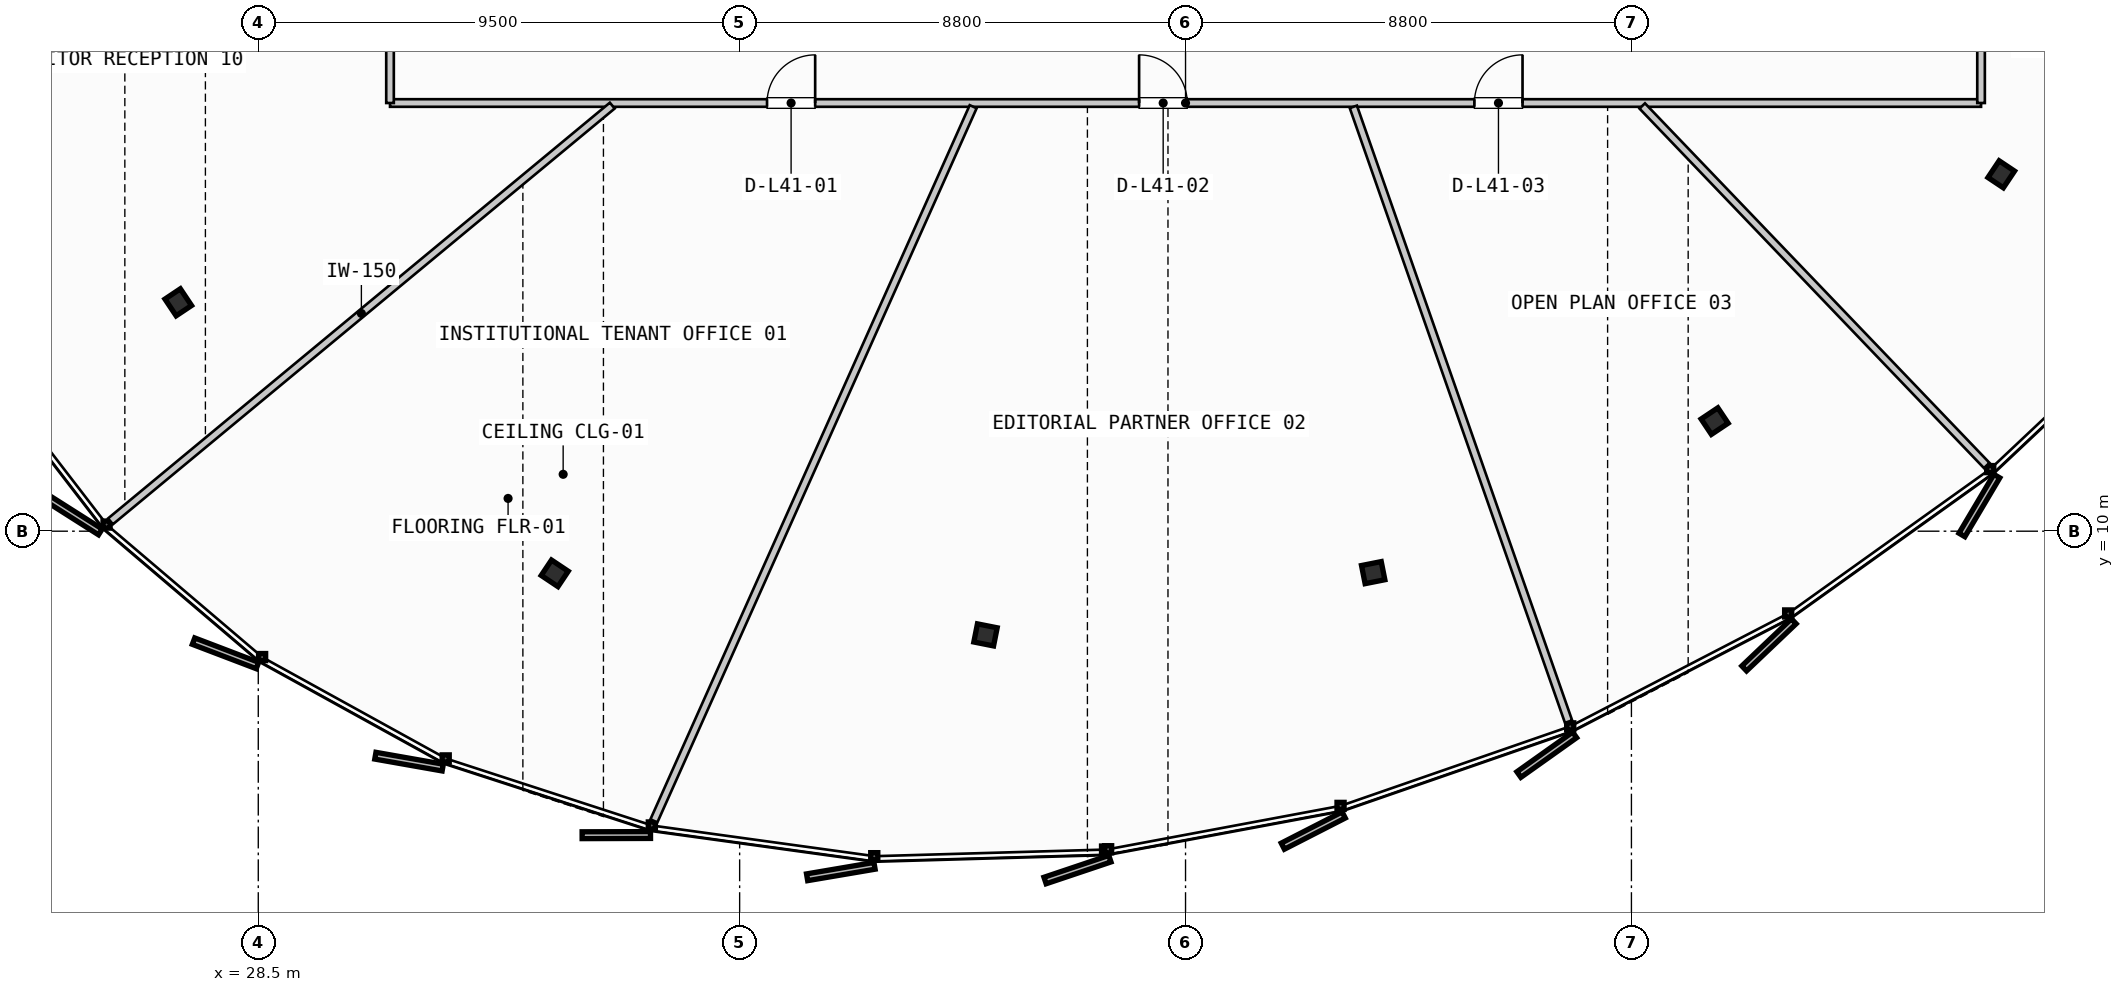
"""IFC4 building model, lengths in metres.
Left out: names, types, materials, properties, quantities, classifications, styles, units other than length and angle.
Written with IfcOpenShell. Run it as: python <this file> out.ifc"""

import sys

from ifc_helpers import new_model, si_unit, direction, frame, frame_2d, origin, origin_2d, place, context, subcontext, project, spatial, rectangle, i_section, extrude, source, transform, mapped, element, fill, save


model = new_model("IFC4")
c1 = context("Model", 3, precision=1e-05, world=origin(), true_north=direction((0.0, 1.0)))
c2 = subcontext(c1, "Body", "Model", "MODEL_VIEW")
j1 = project(units=[si_unit("LENGTHUNIT", "METRE"), si_unit("PLANEANGLEUNIT", "RADIAN")], contexts=[c1])
p1 = place(None, origin())
s1 = spatial("IfcSite", under=j1, at=p1, CompositionType="ELEMENT")
p2 = place(p1, origin())
s2 = spatial("IfcBuilding", under=s1, at=p2, CompositionType="ELEMENT")
p3 = place(p2, frame((0.0, 0.0, 160.75)))
s3 = spatial("IfcBuildingStorey", under=s2, at=p3, CompositionType="ELEMENT", Elevation=160.75)
m1 = source(origin(), c2, "Body", "SweptSolid", [
    extrude(i_section(OverallWidth=0.397, OverallDepth=0.365, WebThickness=0.028, FlangeThickness=0.044, FilletRadius=0.015, at=origin_2d()), origin(), (0.0, 0.0, 1.0), 3.3),
])
for number, where, z_axis, x_axis in (
    (1, (26.921, 14.517, 0.0), (0.0, 0.0, 1.0), (-0.831, -0.556, 0.0)),
    (2, (34.351, 9.168, 0.0), (0.0, 0.0, 1.0), (-0.556, -0.831, 0.0)),
    (3, (42.852, 7.954, 0.0), (0.0, 0.0, 1.0), (-0.195, -0.981, 0.0)),
    (4, (50.503, 9.182, 0.0), (0.0, 0.0, 1.0), (0.195, -0.981, 0.0)),
    (5, (57.242, 12.172, 0.0), (0.0, 0.0, 1.0), (0.556, -0.831, 0.0)),
    (6, (62.899, 17.043, 0.0), (0.0, 0.0, 1.0), (0.831, -0.556, 0.0)),
):
    element("IfcColumn", number, at=place(p3, frame(where, z_axis=z_axis, x_axis=x_axis)), inside=s3, PredefinedType="COLUMN", context=c2, shape_type="MappedRepresentation", body=[
        mapped(m1, transform((0.0, 0.0, 0.0), scale=1.0)),
    ])
p4 = place(p3, frame((31.1, 18.45, 0.0), z_axis=(0.0, 0.0, 1.0), x_axis=(1.0, 0.0, 0.0)))
e7 = element("IfcWall", 7, at=p4, inside=s3, PredefinedType="PARTITIONING", context=c2, shape_type="SweptSolid", body=[
    extrude(rectangle(XDim=31.4, YDim=0.15, at=frame_2d((15.7, 0.0))), origin(), (0.0, 0.0, 1.0), 2.28),
])
p5 = place(p4, frame((7.441, 0.0, 0.0)))
e8 = element("IfcOpeningElement", 8, at=p5, cuts=e7, PredefinedType="OPENING", context=c2, shape_type="SweptSolid", body=[
    extrude(rectangle(XDim=0.95, YDim=2.15, at=frame_2d((0.475, 1.075))), frame((0.0, 0.085, 0.0), z_axis=(0.0, -1.0, 0.0), x_axis=(1.0, 0.0, 0.0)), (0.0, 0.0, 1.0), 0.17),
])
p6 = place(p4, frame((14.784, 0.0, 0.0)))
e9 = element("IfcOpeningElement", 9, at=p6, cuts=e7, PredefinedType="OPENING", context=c2, shape_type="SweptSolid", body=[
    extrude(rectangle(XDim=0.95, YDim=2.15, at=frame_2d((0.475, 1.075))), frame((0.0, 0.085, 0.0), z_axis=(0.0, -1.0, 0.0), x_axis=(1.0, 0.0, 0.0)), (0.0, 0.0, 1.0), 0.17),
])
p7 = place(p4, frame((21.401, 0.0, 0.0)))
e10 = element("IfcOpeningElement", 10, at=p7, cuts=e7, PredefinedType="OPENING", context=c2, shape_type="SweptSolid", body=[
    extrude(rectangle(XDim=0.95, YDim=2.15, at=frame_2d((0.475, 1.075))), frame((0.0, 0.085, 0.0), z_axis=(0.0, -1.0, 0.0), x_axis=(1.0, 0.0, 0.0)), (0.0, 0.0, 1.0), 0.17),
])
for number, where, z_axis, x_axis in (
    (11, (62.5, 18.45, 0.0), (0.0, 0.0, 1.0), (0.0, 1.0, 0.0)),
    (12, (31.1, 20.15, 0.0), (0.0, 0.0, 1.0), (0.0, -1.0, 0.0)),
):
    element("IfcWall", number, at=place(p3, frame(where, z_axis=z_axis, x_axis=x_axis)), inside=s3, PredefinedType="PARTITIONING", context=c2, shape_type="SweptSolid", body=[
        extrude(rectangle(XDim=1.7, YDim=0.15, at=frame_2d((0.85, 0.0))), origin(), (0.0, 0.0, 1.0), 2.28),
    ])
p8 = place(p3, frame((35.486, 18.399, 0.0), z_axis=(0.0, 0.0, 1.0), x_axis=(-0.770045010615, -0.637989562318, 0.0)))
e13 = element("IfcWall", 13, at=p8, inside=s3, PredefinedType="PARTITIONING", context=c2, shape_type="SweptSolid", body=[
    extrude(rectangle(XDim=12.86, YDim=0.15, at=frame_2d((6.43, 0.0))), origin(), (0.0, 0.0, 1.0), 2.28),
])
p9 = place(p3, frame((42.609, 18.377, 0.0), z_axis=(0.0, 0.0, 1.0), x_axis=(-0.408157987145, -0.912911308688, 0.0)))
e14 = element("IfcWall", 14, at=p9, inside=s3, PredefinedType="PARTITIONING", context=c2, shape_type="SweptSolid", body=[
    extrude(rectangle(XDim=15.438, YDim=0.15, at=frame_2d((7.719, 0.0))), origin(), (0.0, 0.0, 1.0), 2.28),
])
p10 = place(p3, frame((50.112, 18.375, 0.0), z_axis=(0.0, 0.0, 1.0), x_axis=(0.330397803149, -0.943841772584, 0.0)))
e15 = element("IfcWall", 15, at=p10, inside=s3, PredefinedType="PARTITIONING", context=c2, shape_type="SweptSolid", body=[
    extrude(rectangle(XDim=12.854, YDim=0.15, at=frame_2d((6.427, 0.0))), origin(), (0.0, 0.0, 1.0), 2.28),
])
p11 = place(p3, frame((55.813, 18.392, 0.0), z_axis=(0.0, 0.0, 1.0), x_axis=(0.691889713395, -0.722003202554, 0.0)))
e16 = element("IfcWall", 16, at=p11, inside=s3, PredefinedType="PARTITIONING", context=c2, shape_type="SweptSolid", body=[
    extrude(rectangle(XDim=9.826, YDim=0.15, at=frame_2d((4.913, 0.0))), origin(), (0.0, 0.0, 1.0), 2.28),
])
m2 = source(origin(), c2, "Body", "SweptSolid", [
    extrude(rectangle(XDim=0.95, YDim=2.15, at=frame_2d((0.475, 1.075))), frame((0.0, 0.025, 0.0), z_axis=(0.0, -1.0, 0.0), x_axis=(1.0, 0.0, 0.0)), (0.0, 0.0, 1.0), 0.05),
])
p12 = place(p5, origin())
e17 = element("IfcDoor", 17, at=p12, inside=s3, OperationType="SINGLE_SWING_RIGHT", PredefinedType="DOOR", context=c2, shape_type="MappedRepresentation", body=[
    mapped(m2, transform((0.0, 0.0, 0.0), scale=1.0)),
])
fill(e8, e17)
p13 = place(p6, origin())
e18 = element("IfcDoor", 18, at=p13, inside=s3, OperationType="SINGLE_SWING_LEFT", PredefinedType="DOOR", context=c2, shape_type="MappedRepresentation", body=[
    mapped(m2, transform((0.0, 0.0, 0.0), scale=1.0)),
])
fill(e9, e18)
p14 = place(p7, origin())
e19 = element("IfcDoor", 19, at=p14, inside=s3, OperationType="SINGLE_SWING_RIGHT", PredefinedType="DOOR", context=c2, shape_type="MappedRepresentation", body=[
    mapped(m2, transform((0.0, 0.0, 0.0), scale=1.0)),
])
fill(e10, e19)
save(model, sys.argv[1])
